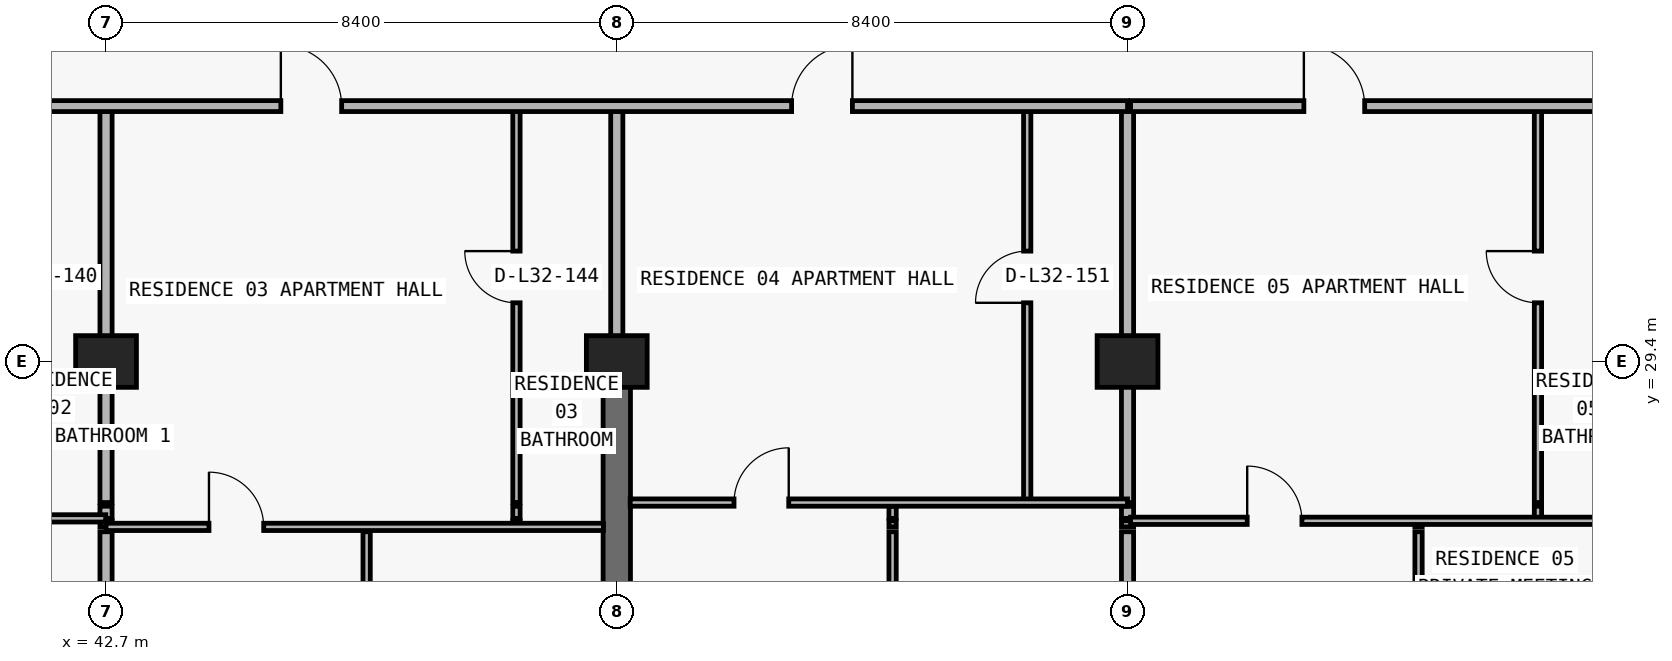
"""IFC4 building model, lengths in metres.
Left out: names, types, materials, properties, quantities, classifications, styles, units other than length and angle.
Written with IfcOpenShell. Run it as: python <this file> out.ifc"""

import sys

from ifc_helpers import new_model, si_unit, direction, frame, frame_2d, origin, origin_2d, place, context, subcontext, project, spatial, rectangle, extrude, element, fill, save


model = new_model("IFC4")
c1 = context("Model", 3, precision=1e-05, world=origin(), true_north=direction((0.0, 1.0)))
c2 = subcontext(c1, "Body", "Model", "MODEL_VIEW")
j1 = project(units=[si_unit("LENGTHUNIT", "METRE"), si_unit("PLANEANGLEUNIT", "RADIAN")], contexts=[c1])
p1 = place(None, origin())
s1 = spatial("IfcSite", under=j1, at=p1, CompositionType="ELEMENT")
p2 = place(p1, origin())
s2 = spatial("IfcBuilding", under=s1, at=p2, CompositionType="ELEMENT")
p3 = place(p2, frame((0.0, 0.0, 119.1)))
s3 = spatial("IfcBuildingStorey", under=s2, at=p3, CompositionType="ELEMENT", Elevation=119.1)
for number, where, z_axis, x_axis in (
    (1, (42.7, 29.4, 0.0), (0.0, 0.0, 1.0), (1.0, 0.0, 0.0)),
    (2, (51.1, 29.4, 0.0), (0.0, 0.0, 1.0), (1.0, 0.0, 0.0)),
    (3, (59.5, 29.4, 0.0), (0.0, 0.0, 1.0), (1.0, 0.0, 0.0)),
):
    element("IfcColumn", number, at=place(p3, frame(where, z_axis=z_axis, x_axis=x_axis)), inside=s3, PredefinedType="COLUMN", context=c2, shape_type="SweptSolid", body=[
        extrude(rectangle(XDim=1.0, YDim=0.85, at=origin_2d()), origin(), (0.0, 0.0, 1.0), 3.05),
    ])
p4 = place(p3, frame((51.1, 20.8, 0.0), z_axis=(0.0, 0.0, 1.0), x_axis=(0.0, 1.0, 0.0)))
e4 = element("IfcWall", 4, at=p4, inside=s3, PredefinedType="SHEAR", context=c2, shape_type="SweptSolid", body=[
    extrude(rectangle(XDim=8.6, YDim=0.45, at=frame_2d((4.3, 0.0))), origin(), (0.0, 0.0, 1.0), 3.05),
])
p5 = place(p3, frame((42.7, 22.22, 0.0), z_axis=(0.0, 0.0, 1.0), x_axis=(0.0, 1.0, 0.0)))
e5 = element("IfcWall", 5, at=p5, inside=s3, PredefinedType="PARTITIONING", context=c2, shape_type="SweptSolid", body=[
    extrude(rectangle(XDim=4.38, YDim=0.2, at=frame_2d((2.19, 0.0))), origin(), (0.0, 0.0, 1.0), 2.174),
])
p6 = place(p3, frame((42.7, 26.68, 0.0), z_axis=(0.0, 0.0, 1.0), x_axis=(0.0, 1.0, 0.0)))
e6 = element("IfcWall", 6, at=p6, inside=s3, PredefinedType="PARTITIONING", context=c2, shape_type="SweptSolid", body=[
    extrude(rectangle(XDim=0.1, YDim=0.2, at=frame_2d((0.05, 0.0))), origin(), (0.0, 0.0, 1.0), 2.174),
])
p7 = place(p3, frame((42.7, 26.82, 0.0), z_axis=(0.0, 0.0, 1.0), x_axis=(0.0, 1.0, 0.0)))
e7 = element("IfcWall", 7, at=p7, inside=s3, PredefinedType="PARTITIONING", context=c2, shape_type="SweptSolid", body=[
    extrude(rectangle(XDim=0.2, YDim=0.2, at=frame_2d((0.1, 0.0))), origin(), (0.0, 0.0, 1.0), 2.174),
])
p8 = place(p3, frame((42.7, 27.08, 0.0), z_axis=(0.0, 0.0, 1.0), x_axis=(0.0, 1.0, 0.0)))
e8 = element("IfcWall", 8, at=p8, inside=s3, PredefinedType="PARTITIONING", context=c2, shape_type="SweptSolid", body=[
    extrude(rectangle(XDim=6.52, YDim=0.2, at=frame_2d((3.26, 0.0))), origin(), (0.0, 0.0, 1.0), 2.174),
])
p9 = place(p3, frame((46.986, 22.22, 0.0), z_axis=(0.0, 0.0, 1.0), x_axis=(0.0, 1.0, 0.0)))
e9 = element("IfcWall", 9, at=p9, inside=s3, PredefinedType="PARTITIONING", context=c2, shape_type="SweptSolid", body=[
    extrude(rectangle(XDim=4.38, YDim=0.12, at=frame_2d((2.19, 0.0))), origin(), (0.0, 0.0, 1.0), 3.05),
])
p10 = place(p9, frame((1.74, 0.0, 0.0)))
e10 = element("IfcOpeningElement", 10, at=p10, cuts=e9, PredefinedType="OPENING", context=c2, shape_type="SweptSolid", body=[
    extrude(rectangle(XDim=0.9, YDim=2.15, at=frame_2d((0.45, 1.075))), frame((0.0, 0.07, 0.0), z_axis=(0.0, -1.0, 0.0), x_axis=(1.0, 0.0, 0.0)), (0.0, 0.0, 1.0), 0.14),
])
p11 = place(p3, frame((49.45, 26.68, 0.0), z_axis=(0.0, 0.0, 1.0), x_axis=(0.0, 1.0, 0.0)))
e11 = element("IfcWall", 11, at=p11, inside=s3, PredefinedType="PARTITIONING", context=c2, shape_type="SweptSolid", body=[
    extrude(rectangle(XDim=0.1, YDim=0.12, at=frame_2d((0.05, 0.0))), origin(), (0.0, 0.0, 1.0), 3.05),
])
p12 = place(p3, frame((49.45, 26.82, 0.0), z_axis=(0.0, 0.0, 1.0), x_axis=(0.0, 1.0, 0.0)))
e12 = element("IfcWall", 12, at=p12, inside=s3, PredefinedType="PARTITIONING", context=c2, shape_type="SweptSolid", body=[
    extrude(rectangle(XDim=0.2, YDim=0.12, at=frame_2d((0.1, 0.0))), origin(), (0.0, 0.0, 1.0), 3.05),
])
p13 = place(p3, frame((49.45, 27.08, 0.0), z_axis=(0.0, 0.0, 1.0), x_axis=(0.0, 1.0, 0.0)))
e13 = element("IfcWall", 13, at=p13, inside=s3, PredefinedType="PARTITIONING", context=c2, shape_type="SweptSolid", body=[
    extrude(rectangle(XDim=6.52, YDim=0.12, at=frame_2d((3.26, 0.0))), origin(), (0.0, 0.0, 1.0), 3.05),
])
p14 = place(p13, frame((3.285, 0.0, 0.0)))
e14 = element("IfcOpeningElement", 14, at=p14, cuts=e13, PredefinedType="OPENING", context=c2, shape_type="SweptSolid", body=[
    extrude(rectangle(XDim=0.85, YDim=2.1, at=frame_2d((0.425, 1.05))), frame((0.0, 0.07, 0.0), z_axis=(0.0, -1.0, 0.0), x_axis=(1.0, 0.0, 0.0)), (0.0, 0.0, 1.0), 0.14),
])
p15 = place(p3, frame((51.1, 29.405, 0.0), z_axis=(0.0, 0.0, 1.0), x_axis=(0.0, 1.0, 0.0)))
e15 = element("IfcWall", 15, at=p15, inside=s3, PredefinedType="PARTITIONING", context=c2, shape_type="SweptSolid", body=[
    extrude(rectangle(XDim=4.195, YDim=0.2, at=frame_2d((2.098, 0.0))), origin(), (0.0, 0.0, 1.0), 2.335),
])
p16 = place(p3, frame((55.636, 22.22, 0.0), z_axis=(0.0, 0.0, 1.0), x_axis=(0.0, 1.0, 0.0)))
e16 = element("IfcWall", 16, at=p16, inside=s3, PredefinedType="PARTITIONING", context=c2, shape_type="SweptSolid", body=[
    extrude(rectangle(XDim=4.38, YDim=0.12, at=frame_2d((2.19, 0.0))), origin(), (0.0, 0.0, 1.0), 3.05),
])
p17 = place(p16, frame((1.74, 0.0, 0.0)))
e17 = element("IfcOpeningElement", 17, at=p17, cuts=e16, PredefinedType="OPENING", context=c2, shape_type="SweptSolid", body=[
    extrude(rectangle(XDim=0.9, YDim=2.15, at=frame_2d((0.45, 1.075))), frame((0.0, 0.07, 0.0), z_axis=(0.0, -1.0, 0.0), x_axis=(1.0, 0.0, 0.0)), (0.0, 0.0, 1.0), 0.14),
])
p18 = place(p3, frame((55.636, 26.68, 0.0), z_axis=(0.0, 0.0, 1.0), x_axis=(0.0, 1.0, 0.0)))
e18 = element("IfcWall", 18, at=p18, inside=s3, PredefinedType="PARTITIONING", context=c2, shape_type="SweptSolid", body=[
    extrude(rectangle(XDim=0.1, YDim=0.12, at=frame_2d((0.05, 0.0))), origin(), (0.0, 0.0, 1.0), 3.05),
])
p19 = place(p3, frame((55.636, 26.82, 0.0), z_axis=(0.0, 0.0, 1.0), x_axis=(0.0, 1.0, 0.0)))
e19 = element("IfcWall", 19, at=p19, inside=s3, PredefinedType="PARTITIONING", context=c2, shape_type="SweptSolid", body=[
    extrude(rectangle(XDim=0.2, YDim=0.12, at=frame_2d((0.1, 0.0))), origin(), (0.0, 0.0, 1.0), 3.05),
])
p20 = place(p3, frame((57.85, 27.08, 0.0), z_axis=(0.0, 0.0, 1.0), x_axis=(0.0, 1.0, 0.0)))
e20 = element("IfcWall", 20, at=p20, inside=s3, PredefinedType="PARTITIONING", context=c2, shape_type="SweptSolid", body=[
    extrude(rectangle(XDim=6.52, YDim=0.12, at=frame_2d((3.26, 0.0))), origin(), (0.0, 0.0, 1.0), 3.05),
])
p21 = place(p20, frame((3.285, 0.0, 0.0)))
e21 = element("IfcOpeningElement", 21, at=p21, cuts=e20, PredefinedType="OPENING", context=c2, shape_type="SweptSolid", body=[
    extrude(rectangle(XDim=0.85, YDim=2.1, at=frame_2d((0.425, 1.05))), frame((0.0, 0.07, 0.0), z_axis=(0.0, -1.0, 0.0), x_axis=(1.0, 0.0, 0.0)), (0.0, 0.0, 1.0), 0.14),
])
p22 = place(p3, frame((59.5, 22.22, 0.0), z_axis=(0.0, 0.0, 1.0), x_axis=(0.0, 1.0, 0.0)))
e22 = element("IfcWall", 22, at=p22, inside=s3, PredefinedType="PARTITIONING", context=c2, shape_type="SweptSolid", body=[
    extrude(rectangle(XDim=4.38, YDim=0.2, at=frame_2d((2.19, 0.0))), origin(), (0.0, 0.0, 1.0), 2.174),
])
p23 = place(p3, frame((59.5, 26.68, 0.0), z_axis=(0.0, 0.0, 1.0), x_axis=(0.0, 1.0, 0.0)))
e23 = element("IfcWall", 23, at=p23, inside=s3, PredefinedType="PARTITIONING", context=c2, shape_type="SweptSolid", body=[
    extrude(rectangle(XDim=0.1, YDim=0.2, at=frame_2d((0.05, 0.0))), origin(), (0.0, 0.0, 1.0), 2.174),
])
p24 = place(p3, frame((59.5, 26.82, 0.0), z_axis=(0.0, 0.0, 1.0), x_axis=(0.0, 1.0, 0.0)))
e24 = element("IfcWall", 24, at=p24, inside=s3, PredefinedType="PARTITIONING", context=c2, shape_type="SweptSolid", body=[
    extrude(rectangle(XDim=0.2, YDim=0.2, at=frame_2d((0.1, 0.0))), origin(), (0.0, 0.0, 1.0), 2.174),
])
p25 = place(p3, frame((59.5, 27.08, 0.0), z_axis=(0.0, 0.0, 1.0), x_axis=(0.0, 1.0, 0.0)))
e25 = element("IfcWall", 25, at=p25, inside=s3, PredefinedType="PARTITIONING", context=c2, shape_type="SweptSolid", body=[
    extrude(rectangle(XDim=6.52, YDim=0.2, at=frame_2d((3.26, 0.0))), origin(), (0.0, 0.0, 1.0), 2.174),
])
p26 = place(p3, frame((64.286, 22.22, 0.0), z_axis=(0.0, 0.0, 1.0), x_axis=(0.0, 1.0, 0.0)))
e26 = element("IfcWall", 26, at=p26, inside=s3, PredefinedType="PARTITIONING", context=c2, shape_type="SweptSolid", body=[
    extrude(rectangle(XDim=4.38, YDim=0.12, at=frame_2d((2.19, 0.0))), origin(), (0.0, 0.0, 1.0), 3.05),
])
p27 = place(p26, frame((1.74, 0.0, 0.0)))
e27 = element("IfcOpeningElement", 27, at=p27, cuts=e26, PredefinedType="OPENING", context=c2, shape_type="SweptSolid", body=[
    extrude(rectangle(XDim=0.9, YDim=2.15, at=frame_2d((0.45, 1.075))), frame((0.0, 0.07, 0.0), z_axis=(0.0, -1.0, 0.0), x_axis=(1.0, 0.0, 0.0)), (0.0, 0.0, 1.0), 0.14),
])
p28 = place(p3, frame((64.286, 26.68, 0.0), z_axis=(0.0, 0.0, 1.0), x_axis=(0.0, 1.0, 0.0)))
e28 = element("IfcWall", 28, at=p28, inside=s3, PredefinedType="PARTITIONING", context=c2, shape_type="SweptSolid", body=[
    extrude(rectangle(XDim=0.1, YDim=0.12, at=frame_2d((0.05, 0.0))), origin(), (0.0, 0.0, 1.0), 3.05),
])
p29 = place(p3, frame((66.25, 26.82, 0.0), z_axis=(0.0, 0.0, 1.0), x_axis=(0.0, 1.0, 0.0)))
e29 = element("IfcWall", 29, at=p29, inside=s3, PredefinedType="PARTITIONING", context=c2, shape_type="SweptSolid", body=[
    extrude(rectangle(XDim=0.2, YDim=0.12, at=frame_2d((0.1, 0.0))), origin(), (0.0, 0.0, 1.0), 3.05),
])
p30 = place(p3, frame((66.25, 27.08, 0.0), z_axis=(0.0, 0.0, 1.0), x_axis=(0.0, 1.0, 0.0)))
e30 = element("IfcWall", 30, at=p30, inside=s3, PredefinedType="PARTITIONING", context=c2, shape_type="SweptSolid", body=[
    extrude(rectangle(XDim=6.52, YDim=0.12, at=frame_2d((3.26, 0.0))), origin(), (0.0, 0.0, 1.0), 3.05),
])
p31 = place(p30, frame((3.285, 0.0, 0.0)))
e31 = element("IfcOpeningElement", 31, at=p31, cuts=e30, PredefinedType="OPENING", context=c2, shape_type="SweptSolid", body=[
    extrude(rectangle(XDim=0.85, YDim=2.1, at=frame_2d((0.425, 1.05))), frame((0.0, 0.07, 0.0), z_axis=(0.0, -1.0, 0.0), x_axis=(1.0, 0.0, 0.0)), (0.0, 0.0, 1.0), 0.14),
])
p32 = place(p3, frame((42.7, 26.68, 0.0), z_axis=(0.0, 0.0, 1.0), x_axis=(1.0, 0.0, 0.0)))
e32 = element("IfcWall", 32, at=p32, inside=s3, PredefinedType="PARTITIONING", context=c2, shape_type="SweptSolid", body=[
    extrude(rectangle(XDim=8.18, YDim=0.12, at=frame_2d((4.09, 0.0))), origin(), (0.0, 0.0, 1.0), 3.05),
])
p33 = place(p32, frame((1.693, 0.0, 0.0)))
e33 = element("IfcOpeningElement", 33, at=p33, cuts=e32, PredefinedType="OPENING", context=c2, shape_type="SweptSolid", body=[
    extrude(rectangle(XDim=0.9, YDim=2.15, at=frame_2d((0.45, 1.075))), frame((0.0, 0.07, 0.0), z_axis=(0.0, -1.0, 0.0), x_axis=(1.0, 0.0, 0.0)), (0.0, 0.0, 1.0), 0.14),
])
p34 = place(p3, frame((59.55, 26.78, 0.0), z_axis=(0.0, 0.0, 1.0), x_axis=(1.0, 0.0, 0.0)))
e34 = element("IfcWall", 34, at=p34, inside=s3, PredefinedType="PARTITIONING", context=c2, shape_type="SweptSolid", body=[
    extrude(rectangle(XDim=8.35, YDim=0.12, at=frame_2d((4.175, 0.0))), origin(), (0.0, 0.0, 1.0), 3.05),
])
p35 = place(p34, frame((1.918, 0.0, 0.0)))
e35 = element("IfcOpeningElement", 35, at=p35, cuts=e34, PredefinedType="OPENING", context=c2, shape_type="SweptSolid", body=[
    extrude(rectangle(XDim=0.9, YDim=2.15, at=frame_2d((0.45, 1.075))), frame((0.0, 0.07, 0.0), z_axis=(0.0, -1.0, 0.0), x_axis=(1.0, 0.0, 0.0)), (0.0, 0.0, 1.0), 0.14),
])
p36 = place(p3, frame((35.1, 26.82, 0.0), z_axis=(0.0, 0.0, 1.0), x_axis=(1.0, 0.0, 0.0)))
e36 = element("IfcWall", 36, at=p36, inside=s3, PredefinedType="PARTITIONING", context=c2, shape_type="SweptSolid", body=[
    extrude(rectangle(XDim=7.595, YDim=0.12, at=frame_2d((3.797, 0.0))), origin(), (0.0, 0.0, 1.0), 3.05),
])
p37 = place(p36, frame((2.6, 0.0, 0.0)))
e37 = element("IfcOpeningElement", 37, at=p37, cuts=e36, PredefinedType="OPENING", context=c2, shape_type="SweptSolid", body=[
    extrude(rectangle(XDim=0.9, YDim=2.15, at=frame_2d((0.45, 1.075))), frame((0.0, 0.07, 0.0), z_axis=(0.0, -1.0, 0.0), x_axis=(1.0, 0.0, 0.0)), (0.0, 0.0, 1.0), 0.14),
])
p38 = place(p3, frame((51.32, 27.08, 0.0), z_axis=(0.0, 0.0, 1.0), x_axis=(1.0, 0.0, 0.0)))
e38 = element("IfcWall", 38, at=p38, inside=s3, PredefinedType="PARTITIONING", context=c2, shape_type="SweptSolid", body=[
    extrude(rectangle(XDim=8.18, YDim=0.12, at=frame_2d((4.09, 0.0))), origin(), (0.0, 0.0, 1.0), 3.05),
])
p39 = place(p38, frame((1.708, 0.0, 0.0)))
e39 = element("IfcOpeningElement", 39, at=p39, cuts=e38, PredefinedType="OPENING", context=c2, shape_type="SweptSolid", body=[
    extrude(rectangle(XDim=0.9, YDim=2.15, at=frame_2d((0.45, 1.075))), frame((0.0, 0.07, 0.0), z_axis=(0.0, -1.0, 0.0), x_axis=(1.0, 0.0, 0.0)), (0.0, 0.0, 1.0), 0.14),
])
p40 = place(p3, frame((18.3, 33.6, 0.0), z_axis=(0.0, 0.0, 1.0), x_axis=(1.0, 0.0, 0.0)))
e40 = element("IfcWall", 40, at=p40, inside=s3, PredefinedType="PARTITIONING", context=c2, shape_type="SweptSolid", body=[
    extrude(rectangle(XDim=41.2, YDim=0.18, at=frame_2d((20.6, 0.0))), origin(), (0.0, 0.0, 1.0), 3.05),
])
p41 = place(p40, frame((11.35, 0.0, 0.0)))
e41 = element("IfcOpeningElement", 41, at=p41, cuts=e40, PredefinedType="OPENING", context=c2, shape_type="SweptSolid", body=[
    extrude(rectangle(XDim=1.0, YDim=2.2, at=frame_2d((0.5, 1.1))), frame((0.0, 0.1, 0.0), z_axis=(0.0, -1.0, 0.0), x_axis=(1.0, 0.0, 0.0)), (0.0, 0.0, 1.0), 0.2),
])
p42 = place(p40, frame((27.275, 0.0, 0.0)))
e42 = element("IfcOpeningElement", 42, at=p42, cuts=e40, PredefinedType="OPENING", context=c2, shape_type="SweptSolid", body=[
    extrude(rectangle(XDim=1.0, YDim=2.2, at=frame_2d((0.5, 1.1))), frame((0.0, 0.1, 0.0), z_axis=(0.0, -1.0, 0.0), x_axis=(1.0, 0.0, 0.0)), (0.0, 0.0, 1.0), 0.2),
])
p43 = place(p40, frame((35.675, 0.0, 0.0)))
e43 = element("IfcOpeningElement", 43, at=p43, cuts=e40, PredefinedType="OPENING", context=c2, shape_type="SweptSolid", body=[
    extrude(rectangle(XDim=1.0, YDim=2.2, at=frame_2d((0.5, 1.1))), frame((0.0, 0.1, 0.0), z_axis=(0.0, -1.0, 0.0), x_axis=(1.0, 0.0, 0.0)), (0.0, 0.0, 1.0), 0.2),
])
p44 = place(p3, frame((59.55, 33.6, 0.0), z_axis=(0.0, 0.0, 1.0), x_axis=(1.0, 0.0, 0.0)))
e44 = element("IfcWall", 44, at=p44, inside=s3, PredefinedType="PARTITIONING", context=c2, shape_type="SweptSolid", body=[
    extrude(rectangle(XDim=10.55, YDim=0.18, at=frame_2d((5.275, 0.0))), origin(), (0.0, 0.0, 1.0), 3.05),
])
p45 = place(p44, frame((2.85, 0.0, 0.0)))
e45 = element("IfcOpeningElement", 45, at=p45, cuts=e44, PredefinedType="OPENING", context=c2, shape_type="SweptSolid", body=[
    extrude(rectangle(XDim=1.0, YDim=2.2, at=frame_2d((0.5, 1.1))), frame((0.0, 0.1, 0.0), z_axis=(0.0, -1.0, 0.0), x_axis=(1.0, 0.0, 0.0)), (0.0, 0.0, 1.0), 0.2),
])
p46 = place(p42, origin())
e46 = element("IfcDoor", 46, at=p46, inside=s3, OperationType="SINGLE_SWING_LEFT", PredefinedType="DOOR", context=c2, shape_type="SweptSolid", body=[
    extrude(rectangle(XDim=1.0, YDim=2.2, at=frame_2d((0.5, 1.1))), frame((0.0, 0.025, 0.0), z_axis=(0.0, -1.0, 0.0), x_axis=(1.0, 0.0, 0.0)), (0.0, 0.0, 1.0), 0.05),
])
fill(e42, e46)
p47 = place(p14, origin())
e47 = element("IfcDoor", 47, at=p47, inside=s3, OperationType="SINGLE_SWING_RIGHT", PredefinedType="DOOR", context=c2, shape_type="SweptSolid", body=[
    extrude(rectangle(XDim=0.85, YDim=2.1, at=frame_2d((0.425, 1.05))), frame((0.0, 0.025, 0.0), z_axis=(0.0, -1.0, 0.0), x_axis=(1.0, 0.0, 0.0)), (0.0, 0.0, 1.0), 0.05),
])
fill(e14, e47)
p48 = place(p33, origin())
e48 = element("IfcDoor", 48, at=p48, inside=s3, OperationType="SINGLE_SWING_LEFT", PredefinedType="DOOR", context=c2, shape_type="SweptSolid", body=[
    extrude(rectangle(XDim=0.9, YDim=2.15, at=frame_2d((0.45, 1.075))), frame((0.0, 0.025, 0.0), z_axis=(0.0, -1.0, 0.0), x_axis=(1.0, 0.0, 0.0)), (0.0, 0.0, 1.0), 0.05),
])
fill(e33, e48)
p49 = place(p43, origin())
e49 = element("IfcDoor", 49, at=p49, inside=s3, OperationType="SINGLE_SWING_RIGHT", PredefinedType="DOOR", context=c2, shape_type="SweptSolid", body=[
    extrude(rectangle(XDim=1.0, YDim=2.2, at=frame_2d((0.5, 1.1))), frame((0.0, 0.025, 0.0), z_axis=(0.0, -1.0, 0.0), x_axis=(1.0, 0.0, 0.0)), (0.0, 0.0, 1.0), 0.05),
])
fill(e43, e49)
p50 = place(p21, origin())
e50 = element("IfcDoor", 50, at=p50, inside=s3, OperationType="SINGLE_SWING_LEFT", PredefinedType="DOOR", context=c2, shape_type="SweptSolid", body=[
    extrude(rectangle(XDim=0.85, YDim=2.1, at=frame_2d((0.425, 1.05))), frame((0.0, 0.025, 0.0), z_axis=(0.0, -1.0, 0.0), x_axis=(1.0, 0.0, 0.0)), (0.0, 0.0, 1.0), 0.05),
])
fill(e21, e50)
p51 = place(p39, origin())
e51 = element("IfcDoor", 51, at=p51, inside=s3, OperationType="SINGLE_SWING_RIGHT", PredefinedType="DOOR", context=c2, shape_type="SweptSolid", body=[
    extrude(rectangle(XDim=0.9, YDim=2.15, at=frame_2d((0.45, 1.075))), frame((0.0, 0.025, 0.0), z_axis=(0.0, -1.0, 0.0), x_axis=(1.0, 0.0, 0.0)), (0.0, 0.0, 1.0), 0.05),
])
fill(e39, e51)
p52 = place(p45, origin())
e52 = element("IfcDoor", 52, at=p52, inside=s3, OperationType="SINGLE_SWING_LEFT", PredefinedType="DOOR", context=c2, shape_type="SweptSolid", body=[
    extrude(rectangle(XDim=1.0, YDim=2.2, at=frame_2d((0.5, 1.1))), frame((0.0, 0.025, 0.0), z_axis=(0.0, -1.0, 0.0), x_axis=(1.0, 0.0, 0.0)), (0.0, 0.0, 1.0), 0.05),
])
fill(e45, e52)
p53 = place(p31, origin())
e53 = element("IfcDoor", 53, at=p53, inside=s3, OperationType="SINGLE_SWING_RIGHT", PredefinedType="DOOR", context=c2, shape_type="SweptSolid", body=[
    extrude(rectangle(XDim=0.85, YDim=2.1, at=frame_2d((0.425, 1.05))), frame((0.0, 0.025, 0.0), z_axis=(0.0, -1.0, 0.0), x_axis=(1.0, 0.0, 0.0)), (0.0, 0.0, 1.0), 0.05),
])
fill(e31, e53)
p54 = place(p35, origin())
e54 = element("IfcDoor", 54, at=p54, inside=s3, OperationType="SINGLE_SWING_LEFT", PredefinedType="DOOR", context=c2, shape_type="SweptSolid", body=[
    extrude(rectangle(XDim=0.9, YDim=2.15, at=frame_2d((0.45, 1.075))), frame((0.0, 0.025, 0.0), z_axis=(0.0, -1.0, 0.0), x_axis=(1.0, 0.0, 0.0)), (0.0, 0.0, 1.0), 0.05),
])
fill(e35, e54)
save(model, sys.argv[1])
